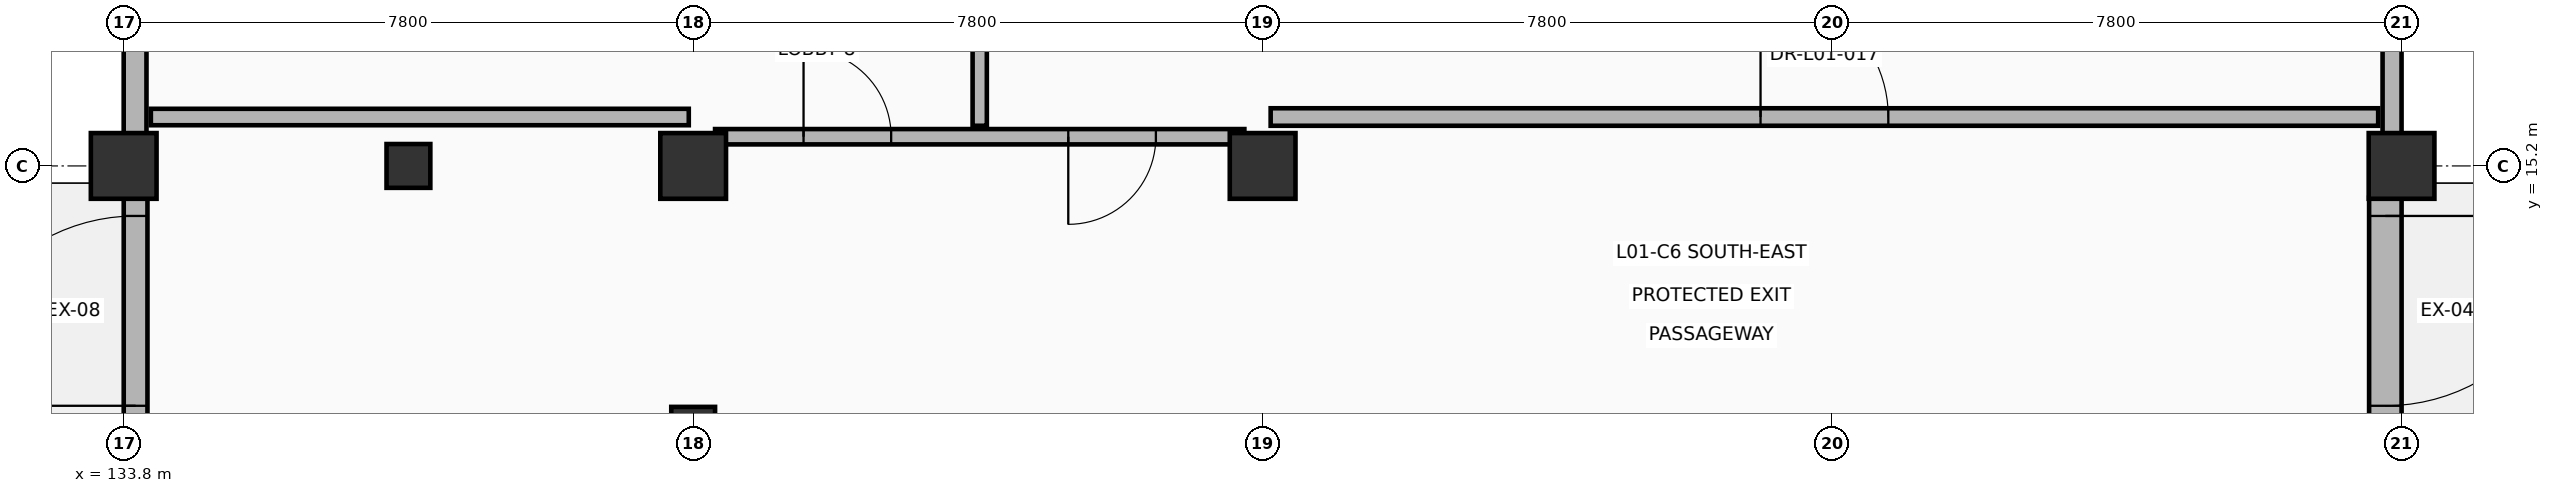
"""IFC4 building model, lengths in metres.
Left out: names, types, materials, properties, quantities, classifications, styles, units other than length and angle.
Written with IfcOpenShell. Run it as: python <this file> out.ifc"""

import sys

from ifc_helpers import new_model, si_unit, direction, frame, frame_2d, origin, origin_2d, place, context, subcontext, project, spatial, rectangle, extrude, element, fill, save


model = new_model("IFC4")
c1 = context("Model", 3, precision=1e-05, world=origin(), true_north=direction((0.0, 1.0)))
c2 = subcontext(c1, "Body", "Model", "MODEL_VIEW")
j1 = project(units=[si_unit("LENGTHUNIT", "METRE"), si_unit("PLANEANGLEUNIT", "RADIAN")], contexts=[c1])
p1 = place(None, origin())
s1 = spatial("IfcSite", under=j1, at=p1, CompositionType="ELEMENT")
p2 = place(p1, origin())
s2 = spatial("IfcBuilding", under=s1, at=p2, CompositionType="ELEMENT")
p3 = place(p2, origin())
s3 = spatial("IfcBuildingStorey", under=s2, at=p3, CompositionType="ELEMENT", Elevation=0.0)
for number, where, z_axis, x_axis in (
    (1, (133.8, 15.2, 0.0), (0.0, 0.0, 1.0), (1.0, 0.0, 0.0)),
    (2, (141.6, 15.2, 0.0), (0.0, 0.0, 1.0), (1.0, 0.0, 0.0)),
    (3, (149.4, 15.2, 0.0), (0.0, 0.0, 1.0), (1.0, 0.0, 0.0)),
    (4, (165.0, 15.2, 0.0), (0.0, 0.0, 1.0), (1.0, 0.0, 0.0)),
):
    element("IfcColumn", number, at=place(p3, frame(where, z_axis=z_axis, x_axis=x_axis)), inside=s3, PredefinedType="COLUMN", context=c2, shape_type="SweptSolid", body=[
        extrude(rectangle(XDim=0.9, YDim=0.9, at=origin_2d()), origin(), (0.0, 0.0, 1.0), 5.4),
    ])
for number, where, z_axis, x_axis in (
    (5, (137.7, 15.2, 0.0), (0.0, 0.0, 1.0), (1.0, 0.0, 0.0)),
    (6, (141.6, 11.6, 0.0), (0.0, 0.0, 1.0), (1.0, 0.0, 0.0)),
):
    element("IfcColumn", number, at=place(p3, frame(where, z_axis=z_axis, x_axis=x_axis)), inside=s3, PredefinedType="COLUMN", context=c2, shape_type="SweptSolid", body=[
        extrude(rectangle(XDim=0.6, YDim=0.6, at=origin_2d()), origin(), (0.0, 0.0, 1.0), 5.4),
    ])
p4 = place(p3, frame((164.87, 22.365, 0.0), z_axis=(0.0, 0.0, 1.0), x_axis=(0.0, -1.0, 0.0)))
e7 = element("IfcWall", 7, at=p4, inside=s3, PredefinedType="SOLIDWALL", context=c2, shape_type="SweptSolid", body=[
    extrude(rectangle(XDim=6.73, YDim=0.26, at=frame_2d((3.365, 0.0))), origin(), (0.0, 0.0, 1.0), 4.422),
])
p5 = place(p4, frame((2.465, 0.0, 0.95)))
e8 = element("IfcOpeningElement", 8, at=p5, cuts=e7, PredefinedType="OPENING", context=c2, shape_type="SweptSolid", body=[
    extrude(rectangle(XDim=1.8, YDim=2.0, at=frame_2d((0.9, 1.0))), frame((0.0, 0.14, 0.0), z_axis=(0.0, -1.0, 0.0), x_axis=(1.0, 0.0, 0.0)), (0.0, 0.0, 1.0), 0.28),
])
p6 = place(p3, frame((164.778, 14.765, 0.0), z_axis=(0.0, 0.0, 1.0), x_axis=(0.0, -1.0, 0.0)))
e9 = element("IfcWall", 9, at=p6, inside=s3, PredefinedType="SOLIDWALL", context=c2, shape_type="SweptSolid", body=[
    extrude(rectangle(XDim=6.33, YDim=0.445, at=frame_2d((3.165, 0.0))), origin(), (0.0, 0.0, 1.0), 4.865),
])
p7 = place(p6, frame((0.25, 0.0, 0.0)))
e10 = element("IfcOpeningElement", 10, at=p7, cuts=e9, PredefinedType="OPENING", context=c2, shape_type="SweptSolid", body=[
    extrude(rectangle(XDim=2.6, YDim=2.6, at=frame_2d((1.3, 1.3))), frame((0.0, 0.232, 0.0), z_axis=(0.0, -1.0, 0.0), x_axis=(1.0, 0.0, 0.0)), (0.0, 0.0, 1.0), 0.465),
])
p8 = place(p3, frame((133.963, 8.435, 0.0), z_axis=(0.0, 0.0, 1.0), x_axis=(0.0, 1.0, 0.0)))
e11 = element("IfcWall", 11, at=p8, inside=s3, PredefinedType="SOLIDWALL", context=c2, shape_type="SweptSolid", body=[
    extrude(rectangle(XDim=6.33, YDim=0.325, at=frame_2d((3.165, 0.0))), origin(), (0.0, 0.0, 1.0), 4.865),
])
p9 = place(p8, frame((3.48, 0.0, 0.0)))
e12 = element("IfcOpeningElement", 12, at=p9, cuts=e11, PredefinedType="OPENING", context=c2, shape_type="SweptSolid", body=[
    extrude(rectangle(XDim=2.6, YDim=2.6, at=frame_2d((1.3, 1.3))), frame((0.0, 0.172, 0.0), z_axis=(0.0, -1.0, 0.0), x_axis=(1.0, 0.0, 0.0)), (0.0, 0.0, 1.0), 0.345),
])
p10 = place(p3, frame((133.956, 15.635, 0.0), z_axis=(0.0, 0.0, 1.0), x_axis=(0.0, 1.0, 0.0)))
e13 = element("IfcWall", 13, at=p10, inside=s3, PredefinedType="SOLIDWALL", context=c2, shape_type="SweptSolid", body=[
    extrude(rectangle(XDim=6.73, YDim=0.312, at=frame_2d((3.365, 0.0))), origin(), (0.0, 0.0, 1.0), 4.422),
])
p11 = place(p10, frame((2.065, 0.0, 0.0)))
e14 = element("IfcOpeningElement", 14, at=p11, cuts=e13, PredefinedType="OPENING", context=c2, shape_type="SweptSolid", body=[
    extrude(rectangle(XDim=2.6, YDim=2.6, at=frame_2d((1.3, 1.3))), frame((0.0, 0.166, 0.0), z_axis=(0.0, -1.0, 0.0), x_axis=(1.0, 0.0, 0.0)), (0.0, 0.0, 1.0), 0.332),
])
p12 = place(p3, frame((141.9, 15.6, 0.0), z_axis=(0.0, 0.0, 1.0), x_axis=(1.0, 0.0, 0.0)))
e15 = element("IfcWall", 15, at=p12, inside=s3, PredefinedType="PARTITIONING", context=c2, shape_type="SweptSolid", body=[
    extrude(rectangle(XDim=7.25, YDim=0.21, at=frame_2d((3.625, 0.0))), origin(), (0.0, 0.0, 1.0), 5.12),
])
p13 = place(p12, frame((1.212, 0.0, 0.0)))
e16 = element("IfcOpeningElement", 16, at=p13, cuts=e15, PredefinedType="OPENING", context=c2, shape_type="SweptSolid", body=[
    extrude(rectangle(XDim=1.2, YDim=2.2, at=frame_2d((0.6, 1.1))), frame((0.0, 0.115, 0.0), z_axis=(0.0, -1.0, 0.0), x_axis=(1.0, 0.0, 0.0)), (0.0, 0.0, 1.0), 0.23),
])
p14 = place(p12, frame((4.838, 0.0, 0.0)))
e17 = element("IfcOpeningElement", 17, at=p14, cuts=e15, PredefinedType="OPENING", context=c2, shape_type="SweptSolid", body=[
    extrude(rectangle(XDim=1.2, YDim=2.2, at=frame_2d((0.6, 1.1))), frame((0.0, 0.115, 0.0), z_axis=(0.0, -1.0, 0.0), x_axis=(1.0, 0.0, 0.0)), (0.0, 0.0, 1.0), 0.23),
])
p15 = place(p3, frame((145.525, 15.75, 0.0), z_axis=(0.0, 0.0, 1.0), x_axis=(0.0, 1.0, 0.0)))
e18 = element("IfcWall", 18, at=p15, inside=s3, PredefinedType="PARTITIONING", context=c2, shape_type="SweptSolid", body=[
    extrude(rectangle(XDim=4.5, YDim=0.195, at=frame_2d((2.25, 0.0))), origin(), (0.0, 0.0, 1.0), 5.12),
])
p16 = place(p15, frame((1.7, 0.0, 0.0)))
e19 = element("IfcOpeningElement", 19, at=p16, cuts=e18, PredefinedType="OPENING", context=c2, shape_type="SweptSolid", body=[
    extrude(rectangle(XDim=1.1, YDim=2.15, at=frame_2d((0.55, 1.075))), frame((0.0, 0.107, 0.0), z_axis=(0.0, -1.0, 0.0), x_axis=(1.0, 0.0, 0.0)), (0.0, 0.0, 1.0), 0.215),
])
p17 = place(p3, frame((149.51, 15.87, 0.0), z_axis=(0.0, 0.0, 1.0), x_axis=(1.0, 0.0, 0.0)))
e20 = element("IfcWall", 20, at=p17, inside=s3, PredefinedType="PARTITIONING", context=c2, shape_type="SweptSolid", body=[
    extrude(rectangle(XDim=15.17, YDim=0.24, at=frame_2d((7.585, 0.0))), origin(), (0.0, 0.0, 1.0), 4.422),
])
p18 = place(p17, frame((6.71, 0.0, 0.0)))
e21 = element("IfcOpeningElement", 21, at=p18, cuts=e20, PredefinedType="OPENING", context=c2, shape_type="SweptSolid", body=[
    extrude(rectangle(XDim=1.75, YDim=2.35, at=frame_2d((0.875, 1.175))), frame((0.0, 0.13, 0.0), z_axis=(0.0, -1.0, 0.0), x_axis=(1.0, 0.0, 0.0)), (0.0, 0.0, 1.0), 0.26),
])
p19 = place(p3, frame((134.172, 15.87, 0.0), z_axis=(0.0, 0.0, 1.0), x_axis=(1.0, 0.0, 0.0)))
e22 = element("IfcWall", 22, at=p19, inside=s3, PredefinedType="PARTITIONING", context=c2, shape_type="SweptSolid", body=[
    extrude(rectangle(XDim=7.368, YDim=0.225, at=frame_2d((3.684, 0.0))), origin(), (0.0, 0.0, 1.0), 4.422),
])
p20 = place(p7, origin())
e23 = element("IfcDoor", 23, at=p20, inside=s3, OperationType="DOUBLE_DOOR_SINGLE_SWING", PredefinedType="DOOR", context=c2, shape_type="SweptSolid", body=[
    extrude(rectangle(XDim=2.6, YDim=2.6, at=frame_2d((1.3, 1.3))), frame((0.0, 0.025, 0.0), z_axis=(0.0, -1.0, 0.0), x_axis=(1.0, 0.0, 0.0)), (0.0, 0.0, 1.0), 0.05),
])
fill(e10, e23)
p21 = place(p9, origin())
e24 = element("IfcDoor", 24, at=p21, inside=s3, OperationType="DOUBLE_DOOR_SINGLE_SWING", PredefinedType="DOOR", context=c2, shape_type="SweptSolid", body=[
    extrude(rectangle(XDim=2.6, YDim=2.6, at=frame_2d((1.3, 1.3))), frame((0.0, 0.025, 0.0), z_axis=(0.0, -1.0, 0.0), x_axis=(1.0, 0.0, 0.0)), (0.0, 0.0, 1.0), 0.05),
])
fill(e12, e24)
p22 = place(p13, origin())
e25 = element("IfcDoor", 25, at=p22, inside=s3, OperationType="SINGLE_SWING_LEFT", PredefinedType="DOOR", context=c2, shape_type="SweptSolid", body=[
    extrude(rectangle(XDim=1.2, YDim=2.2, at=frame_2d((0.6, 1.1))), frame((0.0, 0.025, 0.0), z_axis=(0.0, -1.0, 0.0), x_axis=(1.0, 0.0, 0.0)), (0.0, 0.0, 1.0), 0.05),
])
fill(e16, e25)
p23 = place(p14, origin())
e26 = element("IfcDoor", 26, at=p23, inside=s3, OperationType="SINGLE_SWING_RIGHT", PredefinedType="DOOR", context=c2, shape_type="SweptSolid", body=[
    extrude(rectangle(XDim=1.2, YDim=2.2, at=frame_2d((0.6, 1.1))), frame((0.0, 0.025, 0.0), z_axis=(0.0, -1.0, 0.0), x_axis=(1.0, 0.0, 0.0)), (0.0, 0.0, 1.0), 0.05),
])
fill(e17, e26)
p24 = place(p18, origin())
e27 = element("IfcDoor", 27, at=p24, inside=s3, OperationType="DOUBLE_DOOR_SINGLE_SWING", PredefinedType="DOOR", context=c2, shape_type="SweptSolid", body=[
    extrude(rectangle(XDim=1.75, YDim=2.35, at=frame_2d((0.875, 1.175))), frame((0.0, 0.025, 0.0), z_axis=(0.0, -1.0, 0.0), x_axis=(1.0, 0.0, 0.0)), (0.0, 0.0, 1.0), 0.05),
])
fill(e21, e27)
save(model, sys.argv[1])
